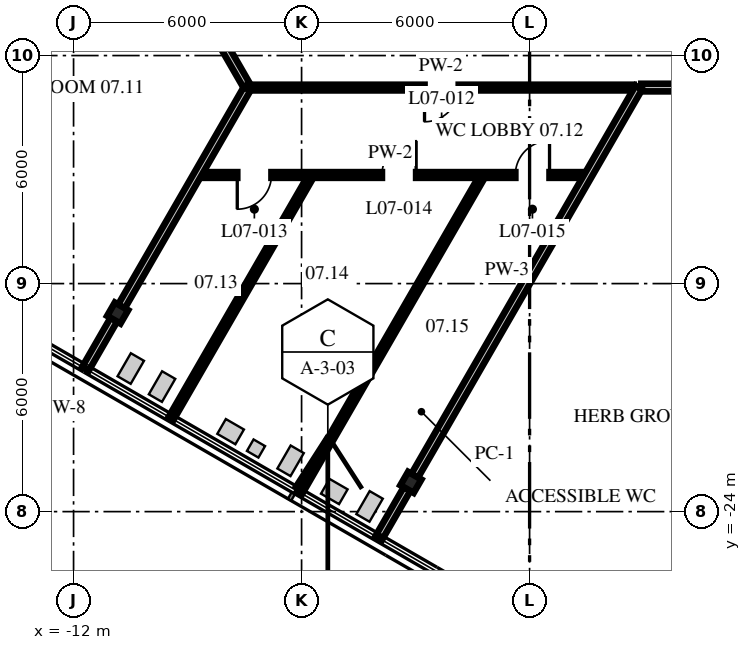
"""IFC4 building model, lengths in metres.
Left out: names, types, materials, properties, quantities, classifications, styles, units other than length and angle.
Written with IfcOpenShell. Run it as: python <this file> out.ifc"""

import sys

from ifc_helpers import new_model, si_unit, direction, frame, frame_2d, origin, origin_2d, place, context, subcontext, project, spatial, rectangle, i_section, extrude, source, transform, mapped, element, fill, save


model = new_model("IFC4")
c1 = context("Model", 3, precision=1e-05, world=origin(), true_north=direction((0.0, 1.0)))
c2 = subcontext(c1, "Body", "Model", "MODEL_VIEW")
j1 = project(units=[si_unit("LENGTHUNIT", "METRE"), si_unit("PLANEANGLEUNIT", "RADIAN")], contexts=[c1])
p1 = place(None, origin())
s1 = spatial("IfcSite", under=j1, at=p1, CompositionType="ELEMENT")
p2 = place(p1, origin())
s2 = spatial("IfcBuilding", under=s1, at=p2, CompositionType="ELEMENT")
p3 = place(p2, frame((0.0, 0.0, 33.2)))
s3 = spatial("IfcBuildingStorey", under=s2, at=p3, CompositionType="ELEMENT", Elevation=33.2)
m1 = source(origin(), c2, "Body", "SweptSolid", [
    extrude(i_section(OverallWidth=0.404, OverallDepth=0.406, WebThickness=0.027, FlangeThickness=0.044, at=origin_2d()), origin(), (0.0, 0.0, 1.0), 4.3),
])
for number, where, z_axis, x_axis in (
    (1, (-10.84, -18.775, 0.0), (0.0, 0.0, 1.0), (0.866, -0.5, 0.0)),
    (2, (-3.124, -23.23, 0.0), (0.0, 0.0, 1.0), (0.866, -0.5, 0.0)),
):
    element("IfcColumn", number, at=place(p3, frame(where, z_axis=z_axis, x_axis=x_axis)), inside=s3, PredefinedType="COLUMN", context=c2, shape_type="MappedRepresentation", body=[
        mapped(m1, transform((0.0, 0.0, 0.0), scale=1.0)),
    ])
m2 = source(origin(), c2, "Body", "SweptSolid", [
    extrude(rectangle(XDim=8.478, YDim=0.2, at=frame_2d((4.239, 0.0))), origin(), (0.0, 0.0, 1.0), 4.1),
])
p4 = place(p3, frame((-11.673, -5.466, 0.0), z_axis=(0.0, 0.0, 1.0), x_axis=(0.499985860718, -0.866033566949, 0.0)))
e3 = element("IfcWall", 3, at=p4, inside=s3, PredefinedType="PARTITIONING", context=c2, shape_type="MappedRepresentation", body=[
    mapped(m2, transform((0.0, 0.0, 0.0), scale=1.0)),
])
m3 = source(origin(), c2, "Body", "SweptSolid", [
    extrude(rectangle(XDim=10.148, YDim=0.15, at=frame_2d((5.074, 0.0))), origin(), (0.0, 0.0, 1.0), 4.1),
])
p5 = place(p3, frame((-8.742, -15.142, 0.0), z_axis=(0.0, 0.0, 1.0), x_axis=(1.0, 0.0, 0.0)))
e4 = element("IfcWall", 4, at=p5, inside=s3, PredefinedType="PARTITIONING", context=c2, shape_type="MappedRepresentation", body=[
    mapped(m3, transform((0.0, 0.0, 0.0), scale=1.0)),
])
p6 = place(p5, frame((1.05, 0.0, 0.0)))
e5 = element("IfcOpeningElement", 5, at=p6, cuts=e4, PredefinedType="OPENING", context=c2, shape_type="SweptSolid", body=[
    extrude(rectangle(XDim=0.9, YDim=2.1, at=frame_2d((0.45, 1.05))), frame((0.0, 0.085, 0.0), z_axis=(0.0, -1.0, 0.0), x_axis=(1.0, 0.0, 0.0)), (0.0, 0.0, 1.0), 0.17),
])
p7 = place(p5, frame((4.857, 0.0, 0.0)))
e6 = element("IfcOpeningElement", 6, at=p7, cuts=e4, PredefinedType="OPENING", context=c2, shape_type="SweptSolid", body=[
    extrude(rectangle(XDim=0.9, YDim=2.1, at=frame_2d((0.45, 1.05))), frame((0.0, 0.085, 0.0), z_axis=(0.0, -1.0, 0.0), x_axis=(1.0, 0.0, 0.0)), (0.0, 0.0, 1.0), 0.17),
])
p8 = place(p5, frame((8.367, 0.0, 0.0)))
e7 = element("IfcOpeningElement", 7, at=p8, cuts=e4, PredefinedType="OPENING", context=c2, shape_type="SweptSolid", body=[
    extrude(rectangle(XDim=0.9, YDim=2.1, at=frame_2d((0.45, 1.05))), frame((0.0, 0.085, 0.0), z_axis=(0.0, -1.0, 0.0), x_axis=(1.0, 0.0, 0.0)), (0.0, 0.0, 1.0), 0.17),
])
m4 = source(origin(), c2, "Body", "SweptSolid", [
    extrude(rectangle(XDim=10.155, YDim=0.15, at=frame_2d((5.078, 0.0))), origin(), (0.0, 0.0, 1.0), 4.1),
])
p9 = place(p3, frame((-7.415, -12.842, 0.0), z_axis=(0.0, 0.0, 1.0), x_axis=(1.0, 0.0, 0.0)))
e8 = element("IfcWall", 8, at=p9, inside=s3, PredefinedType="PARTITIONING", context=c2, shape_type="MappedRepresentation", body=[
    mapped(m4, transform((0.0, 0.0, 0.0), scale=1.0)),
])
p10 = place(p9, frame((4.65, 0.0, 0.0)))
e9 = element("IfcOpeningElement", 9, at=p10, cuts=e8, PredefinedType="OPENING", context=c2, shape_type="SweptSolid", body=[
    extrude(rectangle(XDim=0.9, YDim=2.1, at=frame_2d((0.45, 1.05))), frame((0.0, 0.085, 0.0), z_axis=(0.0, -1.0, 0.0), x_axis=(1.0, 0.0, 0.0)), (0.0, 0.0, 1.0), 0.17),
])
m5 = source(origin(), c2, "Body", "SweptSolid", [
    extrude(rectangle(XDim=4.404, YDim=0.2, at=frame_2d((2.202, 0.0))), origin(), (0.0, 0.0, 1.0), 4.1),
])
p11 = place(p3, frame((2.94, -12.842, 0.0), z_axis=(0.0, 0.0, 1.0), x_axis=(1.0, 0.0, 0.0)))
e10 = element("IfcWall", 10, at=p11, inside=s3, PredefinedType="PARTITIONING", context=c2, shape_type="MappedRepresentation", body=[
    mapped(m5, transform((0.0, 0.0, 0.0), scale=1.0)),
])
p12 = place(p11, frame((1.683, 0.0, 0.0)))
e11 = element("IfcOpeningElement", 11, at=p12, cuts=e10, PredefinedType="OPENING", context=c2, shape_type="SweptSolid", body=[
    extrude(rectangle(XDim=1.0, YDim=2.1, at=frame_2d((0.5, 1.05))), frame((0.0, 0.11, 0.0), z_axis=(0.0, -1.0, 0.0), x_axis=(1.0, 0.0, 0.0)), (0.0, 0.0, 1.0), 0.22),
])
m6 = source(origin(), c2, "Body", "SweptSolid", [
    extrude(rectangle(XDim=1.499, YDim=0.2, at=frame_2d((0.75, 0.0))), origin(), (0.0, 0.0, 1.0), 4.1),
])
p13 = place(p3, frame((-3.969, -24.695, 0.0), z_axis=(0.0, 0.0, 1.0), x_axis=(0.499905760005, 0.866079806435, 0.0)))
e12 = element("IfcWall", 12, at=p13, inside=s3, PredefinedType="PARTITIONING", context=c2, shape_type="MappedRepresentation", body=[
    mapped(m6, transform((0.0, 0.0, 0.0), scale=1.0)),
])
m7 = source(origin(), c2, "Body", "SweptSolid", [
    extrude(rectangle(XDim=11.802, YDim=0.2, at=frame_2d((5.901, 0.0))), origin(), (0.0, 0.0, 1.0), 3.343),
])
p14 = place(p3, frame((-3.027, -23.063, 0.0), z_axis=(0.0, 0.0, 1.0), x_axis=(0.499990468534, 0.866030906709, 0.0)))
e13 = element("IfcWall", 13, at=p14, inside=s3, PredefinedType="PARTITIONING", context=c2, shape_type="MappedRepresentation", body=[
    mapped(m7, transform((0.0, 0.0, 0.0), scale=1.0)),
])
m8 = source(origin(), c2, "Body", "SweptSolid", [
    extrude(rectangle(XDim=9.535, YDim=0.15, at=frame_2d((4.768, 0.0))), origin(), (0.0, 0.0, 1.0), 4.1),
])
p15 = place(p3, frame((-6.048, -23.495, 0.0), z_axis=(0.0, 0.0, 1.0), x_axis=(0.500005412377, 0.866022278924, 0.0)))
e14 = element("IfcWall", 14, at=p15, inside=s3, PredefinedType="PARTITIONING", context=c2, shape_type="MappedRepresentation", body=[
    mapped(m8, transform((0.0, 0.0, 0.0), scale=1.0)),
])
m9 = source(origin(), c2, "Body", "SweptSolid", [
    extrude(rectangle(XDim=7.28, YDim=0.15, at=frame_2d((3.64, 0.0))), origin(), (0.0, 0.0, 1.0), 4.1),
])
p16 = place(p3, frame((-9.43, -21.542, 0.0), z_axis=(0.0, 0.0, 1.0), x_axis=(0.499987591186, 0.866032567898, 0.0)))
e15 = element("IfcWall", 15, at=p16, inside=s3, PredefinedType="PARTITIONING", context=c2, shape_type="MappedRepresentation", body=[
    mapped(m9, transform((0.0, 0.0, 0.0), scale=1.0)),
])
m10 = source(origin(), c2, "Body", "SweptSolid", [
    extrude(rectangle(XDim=1.499, YDim=0.2, at=frame_2d((0.749, 0.0))), origin(), (0.0, 0.0, 1.0), 4.1),
])
p17 = place(p3, frame((-11.686, -20.24, 0.0), z_axis=(0.0, 0.0, 1.0), x_axis=(0.499976292358, 0.866039090965, 0.0)))
e16 = element("IfcWall", 16, at=p17, inside=s3, PredefinedType="PARTITIONING", context=c2, shape_type="MappedRepresentation", body=[
    mapped(m10, transform((0.0, 0.0, 0.0), scale=1.0)),
])
m11 = source(origin(), c2, "Body", "SweptSolid", [
    extrude(rectangle(XDim=6.617, YDim=0.2, at=frame_2d((3.309, 0.0))), origin(), (0.0, 0.0, 1.0), 3.488),
])
p18 = place(p3, frame((-10.743, -18.608, 0.0), z_axis=(0.0, 0.0, 1.0), x_axis=(0.499996046679, 0.866027686223, 0.0)))
e17 = element("IfcWall", 17, at=p18, inside=s3, PredefinedType="PARTITIONING", context=c2, shape_type="MappedRepresentation", body=[
    mapped(m11, transform((0.0, 0.0, 0.0), scale=1.0)),
])
p19 = place(p10, origin())
e18 = element("IfcDoor", 18, at=p19, inside=s3, OperationType="SINGLE_SWING_RIGHT", PredefinedType="DOOR", context=c2, shape_type="SweptSolid", body=[
    extrude(rectangle(XDim=0.9, YDim=2.1, at=frame_2d((0.45, 1.05))), frame((0.0, 0.025, 0.0), z_axis=(0.0, -1.0, 0.0), x_axis=(1.0, 0.0, 0.0)), (0.0, 0.0, 1.0), 0.05),
])
fill(e9, e18)
p20 = place(p6, origin())
e19 = element("IfcDoor", 19, at=p20, inside=s3, OperationType="SINGLE_SWING_RIGHT", PredefinedType="DOOR", context=c2, shape_type="SweptSolid", body=[
    extrude(rectangle(XDim=0.9, YDim=2.1, at=frame_2d((0.45, 1.05))), frame((0.0, 0.025, 0.0), z_axis=(0.0, -1.0, 0.0), x_axis=(1.0, 0.0, 0.0)), (0.0, 0.0, 1.0), 0.05),
])
fill(e5, e19)
p21 = place(p7, origin())
e20 = element("IfcDoor", 20, at=p21, inside=s3, OperationType="SINGLE_SWING_LEFT", PredefinedType="DOOR", context=c2, shape_type="SweptSolid", body=[
    extrude(rectangle(XDim=0.9, YDim=2.1, at=frame_2d((0.45, 1.05))), frame((0.0, 0.025, 0.0), z_axis=(0.0, -1.0, 0.0), x_axis=(1.0, 0.0, 0.0)), (0.0, 0.0, 1.0), 0.05),
])
fill(e6, e20)
p22 = place(p8, origin())
e21 = element("IfcDoor", 21, at=p22, inside=s3, OperationType="SINGLE_SWING_LEFT", PredefinedType="DOOR", context=c2, shape_type="SweptSolid", body=[
    extrude(rectangle(XDim=0.9, YDim=2.1, at=frame_2d((0.45, 1.05))), frame((0.0, 0.025, 0.0), z_axis=(0.0, -1.0, 0.0), x_axis=(1.0, 0.0, 0.0)), (0.0, 0.0, 1.0), 0.05),
])
fill(e7, e21)
save(model, sys.argv[1])
